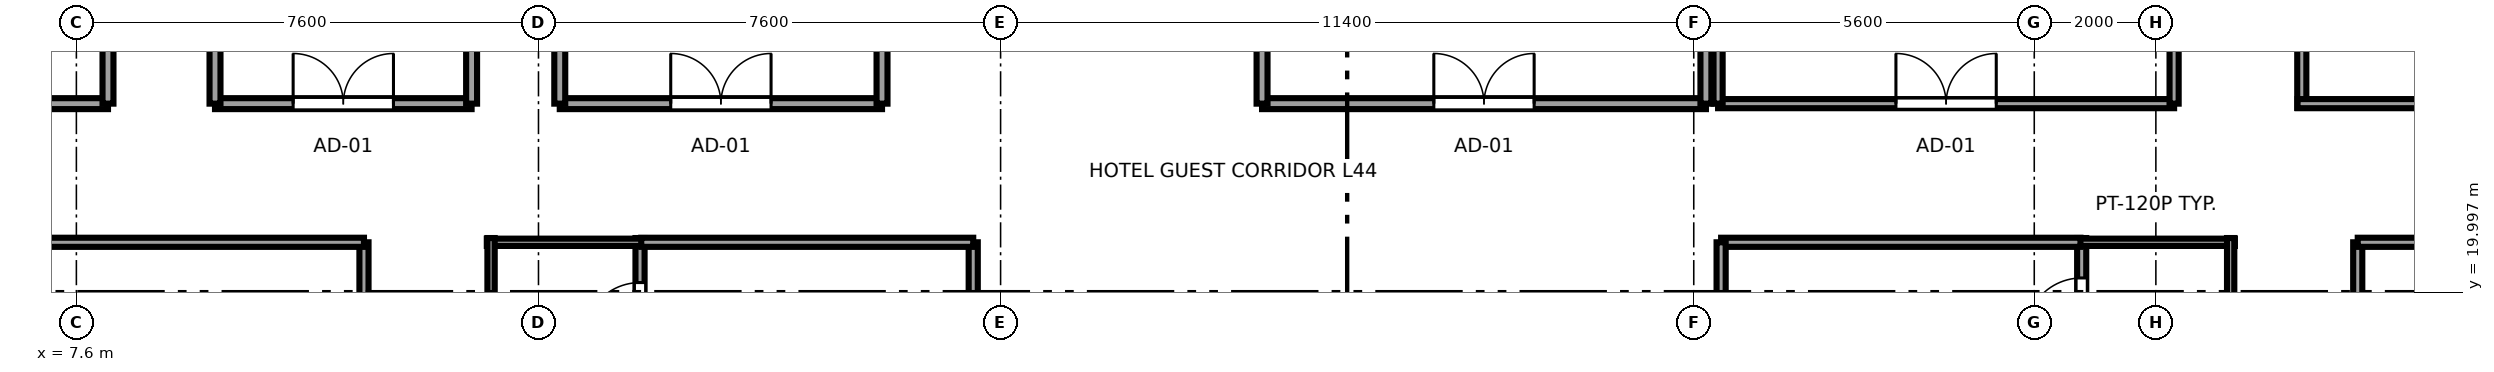
"""IFC4 building model, lengths in metres.
Left out: names, types, materials, properties, quantities, classifications, styles, units other than length and angle.
Written with IfcOpenShell. Run it as: python <this file> out.ifc"""

import sys

from ifc_helpers import new_model, si_unit, direction, frame, frame_2d, origin, place, context, subcontext, project, spatial, rectangle, extrude, source, transform, mapped, element, fill, save


model = new_model("IFC4")
c1 = context("Model", 3, precision=1e-05, world=origin(), true_north=direction((0.0, 1.0)))
c2 = subcontext(c1, "Body", "Model", "MODEL_VIEW")
j1 = project(units=[si_unit("LENGTHUNIT", "METRE"), si_unit("PLANEANGLEUNIT", "RADIAN")], contexts=[c1])
p1 = place(None, origin())
s1 = spatial("IfcSite", under=j1, at=p1, CompositionType="ELEMENT")
p2 = place(p1, origin())
s2 = spatial("IfcBuilding", under=s1, at=p2, CompositionType="ELEMENT")
p3 = place(p2, frame((0.0, 0.0, 168.35)))
s3 = spatial("IfcBuildingStorey", under=s2, at=p3, CompositionType="ELEMENT", Elevation=168.35)
p4 = place(p3, frame((16.87, 18.645, 0.0), z_axis=(0.0, 0.0, 1.0), x_axis=(0.0, 1.0, 0.0)))
e1 = element("IfcWall", 1, at=p4, inside=s3, PredefinedType="PARTITIONING", context=c2, shape_type="SweptSolid", body=[
    extrude(rectangle(XDim=2.245, YDim=0.15, at=frame_2d((1.123, 0.0))), origin(), (0.0, 0.0, 1.0), 3.37),
])
p5 = place(p4, frame((0.593, 0.0, 0.0)))
e2 = element("IfcOpeningElement", 2, at=p5, cuts=e1, PredefinedType="OPENING", context=c2, shape_type="SweptSolid", body=[
    extrude(rectangle(XDim=0.92, YDim=2.01, at=frame_2d((0.46, 1.005))), frame((0.0, 0.085, 0.0), z_axis=(0.0, -1.0, 0.0), x_axis=(1.0, 0.0, 0.0)), (0.0, 0.0, 1.0), 0.17),
])
p6 = place(p3, frame((14.35, 20.82, 0.0), z_axis=(0.0, 0.0, 1.0), x_axis=(1.0, 0.0, 0.0)))
e3 = element("IfcWall", 3, at=p6, inside=s3, PredefinedType="PLUMBINGWALL", context=c2, shape_type="SweptSolid", body=[
    extrude(rectangle(XDim=2.59, YDim=0.12, at=frame_2d((1.295, 0.0))), origin(), (0.0, 0.0, 1.0), 3.37),
])
p7 = place(p3, frame((14.42, 18.645, 0.0), z_axis=(0.0, 0.0, 1.0), x_axis=(0.0, 1.0, 0.0)))
e4 = element("IfcWall", 4, at=p7, inside=s3, PredefinedType="PLUMBINGWALL", context=c2, shape_type="SweptSolid", body=[
    extrude(rectangle(XDim=2.245, YDim=0.12, at=frame_2d((1.123, 0.0))), origin(), (0.0, 0.0, 1.0), 3.37),
])
p8 = place(p3, frame((40.58, 18.797, 0.0), z_axis=(0.0, 0.0, 1.0), x_axis=(0.0, 1.0, 0.0)))
e5 = element("IfcWall", 5, at=p8, inside=s3, PredefinedType="PARTITIONING", context=c2, shape_type="SweptSolid", body=[
    extrude(rectangle(XDim=2.093, YDim=0.15, at=frame_2d((1.046, 0.0))), origin(), (0.0, 0.0, 1.0), 3.37),
])
p9 = place(p8, frame((0.517, 0.0, 0.0)))
e6 = element("IfcOpeningElement", 6, at=p9, cuts=e5, PredefinedType="OPENING", context=c2, shape_type="SweptSolid", body=[
    extrude(rectangle(XDim=0.92, YDim=2.01, at=frame_2d((0.46, 1.005))), frame((0.0, 0.085, 0.0), z_axis=(0.0, -1.0, 0.0), x_axis=(1.0, 0.0, 0.0)), (0.0, 0.0, 1.0), 0.17),
])
p10 = place(p3, frame((40.51, 20.82, 0.0), z_axis=(0.0, 0.0, 1.0), x_axis=(1.0, 0.0, 0.0)))
e7 = element("IfcWall", 7, at=p10, inside=s3, PredefinedType="PLUMBINGWALL", context=c2, shape_type="SweptSolid", body=[
    extrude(rectangle(XDim=2.59, YDim=0.12, at=frame_2d((1.295, 0.0))), origin(), (0.0, 0.0, 1.0), 3.37),
])
p11 = place(p3, frame((43.03, 18.797, 0.0), z_axis=(0.0, 0.0, 1.0), x_axis=(0.0, 1.0, 0.0)))
e8 = element("IfcWall", 8, at=p11, inside=s3, PredefinedType="PLUMBINGWALL", context=c2, shape_type="SweptSolid", body=[
    extrude(rectangle(XDim=2.093, YDim=0.12, at=frame_2d((1.046, 0.0))), origin(), (0.0, 0.0, 1.0), 3.37),
])
p12 = place(p3, frame((12.33, 17.341, 0.0), z_axis=(0.0, 0.0, 1.0), x_axis=(0.0, 1.0, 0.0)))
e9 = element("IfcWall", 9, at=p12, inside=s3, PredefinedType="PARTITIONING", context=c2, shape_type="SweptSolid", body=[
    extrude(rectangle(XDim=3.479, YDim=0.15, at=frame_2d((1.74, 0.0))), origin(), (0.0, 0.0, 1.0), 3.37),
])
p13 = place(p12, frame((1.229, 0.0, 0.0)))
e10 = element("IfcOpeningElement", 10, at=p13, cuts=e9, PredefinedType="OPENING", context=c2, shape_type="SweptSolid", body=[
    extrude(rectangle(XDim=0.98, YDim=2.12, at=frame_2d((0.49, 1.06))), frame((0.0, 0.085, 0.0), z_axis=(0.0, -1.0, 0.0), x_axis=(1.0, 0.0, 0.0)), (0.0, 0.0, 1.0), 0.17),
])
p14 = place(p3, frame((3.005, 20.82, 0.0), z_axis=(0.0, 0.0, 1.0), x_axis=(1.0, 0.0, 0.0)))
e11 = element("IfcWall", 11, at=p14, inside=s3, PredefinedType="PARTITIONING", context=c2, shape_type="SweptSolid", body=[
    extrude(rectangle(XDim=9.325, YDim=0.15, at=frame_2d((4.663, 0.0))), origin(), (0.0, 0.0, 1.0), 3.37),
])
p15 = place(p3, frame((22.35, 15.28, 0.0), z_axis=(0.0, 0.0, 1.0), x_axis=(0.0, 1.0, 0.0)))
e12 = element("IfcWall", 12, at=p15, inside=s3, PredefinedType="PARTITIONING", context=c2, shape_type="SweptSolid", body=[
    extrude(rectangle(XDim=5.54, YDim=0.15, at=frame_2d((2.77, 0.0))), origin(), (0.0, 0.0, 1.0), 3.37),
])
p16 = place(p3, frame((16.89, 20.82, 0.0), z_axis=(0.0, 0.0, 1.0), x_axis=(1.0, 0.0, 0.0)))
e13 = element("IfcWall", 13, at=p16, inside=s3, PredefinedType="PARTITIONING", context=c2, shape_type="SweptSolid", body=[
    extrude(rectangle(XDim=5.46, YDim=0.15, at=frame_2d((2.73, 0.0))), origin(), (0.0, 0.0, 1.0), 3.37),
])
p17 = place(p3, frame((34.65, 20.82, 0.0), z_axis=(0.0, 0.0, 1.0), x_axis=(1.0, 0.0, 0.0)))
e14 = element("IfcWall", 14, at=p17, inside=s3, PredefinedType="PARTITIONING", context=c2, shape_type="SweptSolid", body=[
    extrude(rectangle(XDim=5.91, YDim=0.15, at=frame_2d((2.955, 0.0))), origin(), (0.0, 0.0, 1.0), 3.37),
])
p18 = place(p3, frame((34.65, 15.68, 0.0), z_axis=(0.0, 0.0, 1.0), x_axis=(0.0, 1.0, 0.0)))
e15 = element("IfcWall", 15, at=p18, inside=s3, PredefinedType="PARTITIONING", context=c2, shape_type="SweptSolid", body=[
    extrude(rectangle(XDim=5.14, YDim=0.15, at=frame_2d((2.57, 0.0))), origin(), (0.0, 0.0, 1.0), 3.37),
])
p19 = place(p3, frame((45.12, 17.341, 0.0), z_axis=(0.0, 0.0, 1.0), x_axis=(0.0, 1.0, 0.0)))
e16 = element("IfcWall", 16, at=p19, inside=s3, PredefinedType="PARTITIONING", context=c2, shape_type="SweptSolid", body=[
    extrude(rectangle(XDim=3.479, YDim=0.15, at=frame_2d((1.74, 0.0))), origin(), (0.0, 0.0, 1.0), 3.37),
])
p20 = place(p19, frame((1.229, 0.0, 0.0)))
e17 = element("IfcOpeningElement", 17, at=p20, cuts=e16, PredefinedType="OPENING", context=c2, shape_type="SweptSolid", body=[
    extrude(rectangle(XDim=0.98, YDim=2.12, at=frame_2d((0.49, 1.06))), frame((0.0, 0.085, 0.0), z_axis=(0.0, -1.0, 0.0), x_axis=(1.0, 0.0, 0.0)), (0.0, 0.0, 1.0), 0.17),
])
p21 = place(p3, frame((45.12, 20.82, 0.0), z_axis=(0.0, 0.0, 1.0), x_axis=(1.0, 0.0, 0.0)))
e18 = element("IfcWall", 18, at=p21, inside=s3, PredefinedType="PARTITIONING", context=c2, shape_type="SweptSolid", body=[
    extrude(rectangle(XDim=8.98, YDim=0.15, at=frame_2d((4.49, 0.0))), origin(), (0.0, 0.0, 1.0), 3.37),
])
p22 = place(p3, frame((3.005, 23.1, 0.0), z_axis=(0.0, 0.0, 1.0), x_axis=(1.0, 0.0, 0.0)))
e19 = element("IfcWall", 19, at=p22, inside=s3, PredefinedType="PARTITIONING", context=c2, shape_type="SweptSolid", body=[
    extrude(rectangle(XDim=5.115, YDim=0.18, at=frame_2d((2.558, 0.0))), origin(), (0.0, 0.0, 1.0), 3.37),
])
p23 = place(p3, frame((8.12, 23.1, 0.0), z_axis=(0.0, 0.0, 1.0), x_axis=(0.0, 1.0, 0.0)))
e20 = element("IfcWall", 20, at=p23, inside=s3, PredefinedType="PARTITIONING", context=c2, shape_type="SweptSolid", body=[
    extrude(rectangle(XDim=8.1, YDim=0.18, at=frame_2d((4.05, 0.0))), origin(), (0.0, 0.0, 1.0), 3.37),
])
p24 = place(p23, frame((3.225, 0.0, 0.0)))
e21 = element("IfcOpeningElement", 21, at=p24, cuts=e20, PredefinedType="OPENING", context=c2, shape_type="SweptSolid", body=[
    extrude(rectangle(XDim=1.65, YDim=2.15, at=frame_2d((0.825, 1.075))), frame((0.0, 0.1, 0.0), z_axis=(0.0, -1.0, 0.0), x_axis=(1.0, 0.0, 0.0)), (0.0, 0.0, 1.0), 0.2),
])
p25 = place(p3, frame((44.2, 23.03, 0.0), z_axis=(0.0, 0.0, 1.0), x_axis=(0.0, 1.0, 0.0)))
e22 = element("IfcWall", 22, at=p25, inside=s3, PredefinedType="PARTITIONING", context=c2, shape_type="SweptSolid", body=[
    extrude(rectangle(XDim=3.74, YDim=0.15, at=frame_2d((1.87, 0.0))), origin(), (0.0, 0.0, 1.0), 3.37),
])
p26 = place(p25, frame((1.24, 0.0, 0.0)))
e23 = element("IfcOpeningElement", 23, at=p26, cuts=e22, PredefinedType="OPENING", context=c2, shape_type="SweptSolid", body=[
    extrude(rectangle(XDim=0.92, YDim=2.01, at=frame_2d((0.46, 1.005))), frame((0.0, 0.085, 0.0), z_axis=(0.0, -1.0, 0.0), x_axis=(1.0, 0.0, 0.0)), (0.0, 0.0, 1.0), 0.17),
])
p27 = place(p3, frame((44.13, 23.1, 0.0), z_axis=(0.0, 0.0, 1.0), x_axis=(1.0, 0.0, 0.0)))
e24 = element("IfcWall", 24, at=p27, inside=s3, PredefinedType="PARTITIONING", context=c2, shape_type="SweptSolid", body=[
    extrude(rectangle(XDim=4.54, YDim=0.15, at=frame_2d((2.27, 0.0))), origin(), (0.0, 0.0, 1.0), 3.37),
])
p28 = place(p3, frame((9.88, 23.1, 0.0), z_axis=(0.0, 0.0, 1.0), x_axis=(1.0, 0.0, 0.0)))
e25 = element("IfcWall", 25, at=p28, inside=s3, PredefinedType="PARTITIONING", context=c2, shape_type="SweptSolid", body=[
    extrude(rectangle(XDim=4.22, YDim=0.18, at=frame_2d((2.11, 0.0))), origin(), (0.0, 0.0, 1.0), 3.37),
])
p29 = place(p28, frame((1.285, 0.0, 0.0)))
e26 = element("IfcOpeningElement", 26, at=p29, cuts=e25, PredefinedType="OPENING", context=c2, shape_type="SweptSolid", body=[
    extrude(rectangle(XDim=1.65, YDim=2.15, at=frame_2d((0.825, 1.075))), frame((0.0, 0.1, 0.0), z_axis=(0.0, -1.0, 0.0), x_axis=(1.0, 0.0, 0.0)), (0.0, 0.0, 1.0), 0.2),
])
for number, where, z_axis, x_axis in (
    (27, (9.88, 23.1, 0.0), (0.0, 0.0, 1.0), (0.0, 1.0, 0.0)),
    (28, (14.1, 23.1, 0.0), (0.0, 0.0, 1.0), (0.0, 1.0, 0.0)),
):
    element("IfcWall", number, at=place(p3, frame(where, z_axis=z_axis, x_axis=x_axis)), inside=s3, PredefinedType="PARTITIONING", context=c2, shape_type="SweptSolid", body=[
        extrude(rectangle(XDim=6.65, YDim=0.18, at=frame_2d((3.325, 0.0))), origin(), (0.0, 0.0, 1.0), 3.37),
    ])
p30 = place(p3, frame((27.1, 23.1, 0.0), z_axis=(0.0, 0.0, 1.0), x_axis=(1.0, 0.0, 0.0)))
e29 = element("IfcWall", 29, at=p30, inside=s3, PredefinedType="PARTITIONING", context=c2, shape_type="SweptSolid", body=[
    extrude(rectangle(XDim=7.3, YDim=0.18, at=frame_2d((3.65, 0.0))), origin(), (0.0, 0.0, 1.0), 3.37),
])
p31 = place(p30, frame((2.825, 0.0, 0.0)))
e30 = element("IfcOpeningElement", 30, at=p31, cuts=e29, PredefinedType="OPENING", context=c2, shape_type="SweptSolid", body=[
    extrude(rectangle(XDim=1.65, YDim=2.15, at=frame_2d((0.825, 1.075))), frame((0.0, 0.1, 0.0), z_axis=(0.0, -1.0, 0.0), x_axis=(1.0, 0.0, 0.0)), (0.0, 0.0, 1.0), 0.2),
])
for number, where, z_axis, x_axis in (
    (31, (27.1, 23.1, 0.0), (0.0, 0.0, 1.0), (0.0, 1.0, 0.0)),
    (32, (34.4, 23.1, 0.0), (0.0, 0.0, 1.0), (0.0, 1.0, 0.0)),
):
    element("IfcWall", number, at=place(p3, frame(where, z_axis=z_axis, x_axis=x_axis)), inside=s3, PredefinedType="PARTITIONING", context=c2, shape_type="SweptSolid", body=[
        extrude(rectangle(XDim=6.7, YDim=0.18, at=frame_2d((3.35, 0.0))), origin(), (0.0, 0.0, 1.0), 3.37),
    ])
p32 = place(p3, frame((15.55, 23.1, 0.0), z_axis=(0.0, 0.0, 1.0), x_axis=(1.0, 0.0, 0.0)))
e33 = element("IfcWall", 33, at=p32, inside=s3, PredefinedType="PARTITIONING", context=c2, shape_type="SweptSolid", body=[
    extrude(rectangle(XDim=5.3, YDim=0.18, at=frame_2d((2.65, 0.0))), origin(), (0.0, 0.0, 1.0), 3.37),
])
p33 = place(p32, frame((1.825, 0.0, 0.0)))
e34 = element("IfcOpeningElement", 34, at=p33, cuts=e33, PredefinedType="OPENING", context=c2, shape_type="SweptSolid", body=[
    extrude(rectangle(XDim=1.65, YDim=2.15, at=frame_2d((0.825, 1.075))), frame((0.0, 0.1, 0.0), z_axis=(0.0, -1.0, 0.0), x_axis=(1.0, 0.0, 0.0)), (0.0, 0.0, 1.0), 0.2),
])
for number, where, z_axis, x_axis in (
    (35, (15.55, 23.1, 0.0), (0.0, 0.0, 1.0), (0.0, 1.0, 0.0)),
    (36, (20.85, 23.1, 0.0), (0.0, 0.0, 1.0), (0.0, 1.0, 0.0)),
):
    element("IfcWall", number, at=place(p3, frame(where, z_axis=z_axis, x_axis=x_axis)), inside=s3, PredefinedType="PARTITIONING", context=c2, shape_type="SweptSolid", body=[
        extrude(rectangle(XDim=6.7, YDim=0.18, at=frame_2d((3.35, 0.0))), origin(), (0.0, 0.0, 1.0), 3.37),
    ])
p34 = place(p3, frame((34.6, 23.1, 0.0), z_axis=(0.0, 0.0, 1.0), x_axis=(1.0, 0.0, 0.0)))
e37 = element("IfcWall", 37, at=p34, inside=s3, PredefinedType="PARTITIONING", context=c2, shape_type="SweptSolid", body=[
    extrude(rectangle(XDim=7.5, YDim=0.15, at=frame_2d((3.75, 0.0))), origin(), (0.0, 0.0, 1.0), 3.37),
])
p35 = place(p34, frame((2.925, 0.0, 0.0)))
e38 = element("IfcOpeningElement", 38, at=p35, cuts=e37, PredefinedType="OPENING", context=c2, shape_type="SweptSolid", body=[
    extrude(rectangle(XDim=1.65, YDim=2.15, at=frame_2d((0.825, 1.075))), frame((0.0, 0.085, 0.0), z_axis=(0.0, -1.0, 0.0), x_axis=(1.0, 0.0, 0.0)), (0.0, 0.0, 1.0), 0.17),
])
p36 = place(p3, frame((34.6, 23.1, 0.0), z_axis=(0.0, 0.0, 1.0), x_axis=(0.0, 1.0, 0.0)))
e39 = element("IfcWall", 39, at=p36, inside=s3, PredefinedType="PARTITIONING", context=c2, shape_type="SweptSolid", body=[
    extrude(rectangle(XDim=6.3, YDim=0.15, at=frame_2d((3.15, 0.0))), origin(), (0.0, 0.0, 1.0), 3.37),
])
p37 = place(p3, frame((42.1, 23.1, 0.0), z_axis=(0.0, 0.0, 1.0), x_axis=(0.0, 1.0, 0.0)))
e40 = element("IfcWall", 40, at=p37, inside=s3, PredefinedType="PARTITIONING", context=c2, shape_type="SweptSolid", body=[
    extrude(rectangle(XDim=6.3, YDim=0.15, at=frame_2d((3.15, 0.0))), origin(), (0.0, 0.0, 1.0), 2.16),
])
m1 = source(origin(), c2, "Body", "SweptSolid", [
    extrude(rectangle(XDim=0.92, YDim=2.01, at=frame_2d((0.46, 1.005))), frame((0.0, 0.025, 0.0), z_axis=(0.0, -1.0, 0.0), x_axis=(1.0, 0.0, 0.0)), (0.0, 0.0, 1.0), 0.05),
])
p38 = place(p5, origin())
e41 = element("IfcDoor", 41, at=p38, inside=s3, OperationType="SINGLE_SWING_LEFT", PredefinedType="DOOR", context=c2, shape_type="MappedRepresentation", body=[
    mapped(m1, transform((0.0, 0.0, 0.0), x_axis=(1.0, 0.0, 0.0), y_axis=(0.0, 1.0, 0.0), z_axis=(0.0, 0.0, 1.0), scale=1.0)),
])
fill(e2, e41)
p39 = place(p9, origin())
e42 = element("IfcDoor", 42, at=p39, inside=s3, OperationType="SINGLE_SWING_LEFT", PredefinedType="DOOR", context=c2, shape_type="MappedRepresentation", body=[
    mapped(m1, transform((0.0, 0.0, 0.0), x_axis=(1.0, 0.0, 0.0), y_axis=(0.0, 1.0, 0.0), z_axis=(0.0, 0.0, 1.0), scale=1.0)),
])
fill(e6, e42)
m2 = source(origin(), c2, "Body", "SweptSolid", [
    extrude(rectangle(XDim=1.65, YDim=2.15, at=frame_2d((0.825, 1.075))), frame((0.0, 0.025, 0.0), z_axis=(0.0, -1.0, 0.0), x_axis=(1.0, 0.0, 0.0)), (0.0, 0.0, 1.0), 0.05),
])
p40 = place(p29, origin())
e43 = element("IfcDoor", 43, at=p40, inside=s3, OperationType="DOUBLE_DOOR_SINGLE_SWING", PredefinedType="DOOR", context=c2, shape_type="MappedRepresentation", body=[
    mapped(m2, transform((0.0, 0.0, 0.0), x_axis=(1.0, 0.0, 0.0), y_axis=(0.0, 1.0, 0.0), z_axis=(0.0, 0.0, 1.0), scale=1.0)),
])
fill(e26, e43)
p41 = place(p31, origin())
e44 = element("IfcDoor", 44, at=p41, inside=s3, OperationType="DOUBLE_DOOR_SINGLE_SWING", PredefinedType="DOOR", context=c2, shape_type="MappedRepresentation", body=[
    mapped(m2, transform((0.0, 0.0, 0.0), x_axis=(1.0, 0.0, 0.0), y_axis=(0.0, 1.0, 0.0), z_axis=(0.0, 0.0, 1.0), scale=1.0)),
])
fill(e30, e44)
p42 = place(p33, origin())
e45 = element("IfcDoor", 45, at=p42, inside=s3, OperationType="DOUBLE_DOOR_SINGLE_SWING", PredefinedType="DOOR", context=c2, shape_type="MappedRepresentation", body=[
    mapped(m2, transform((0.0, 0.0, 0.0), x_axis=(1.0, 0.0, 0.0), y_axis=(0.0, 1.0, 0.0), z_axis=(0.0, 0.0, 1.0), scale=1.0)),
])
fill(e34, e45)
p43 = place(p35, origin())
e46 = element("IfcDoor", 46, at=p43, inside=s3, OperationType="DOUBLE_DOOR_SINGLE_SWING", PredefinedType="DOOR", context=c2, shape_type="MappedRepresentation", body=[
    mapped(m2, transform((0.0, 0.0, 0.0), x_axis=(1.0, 0.0, 0.0), y_axis=(0.0, 1.0, 0.0), z_axis=(0.0, 0.0, 1.0), scale=1.0)),
])
fill(e38, e46)
save(model, sys.argv[1])
